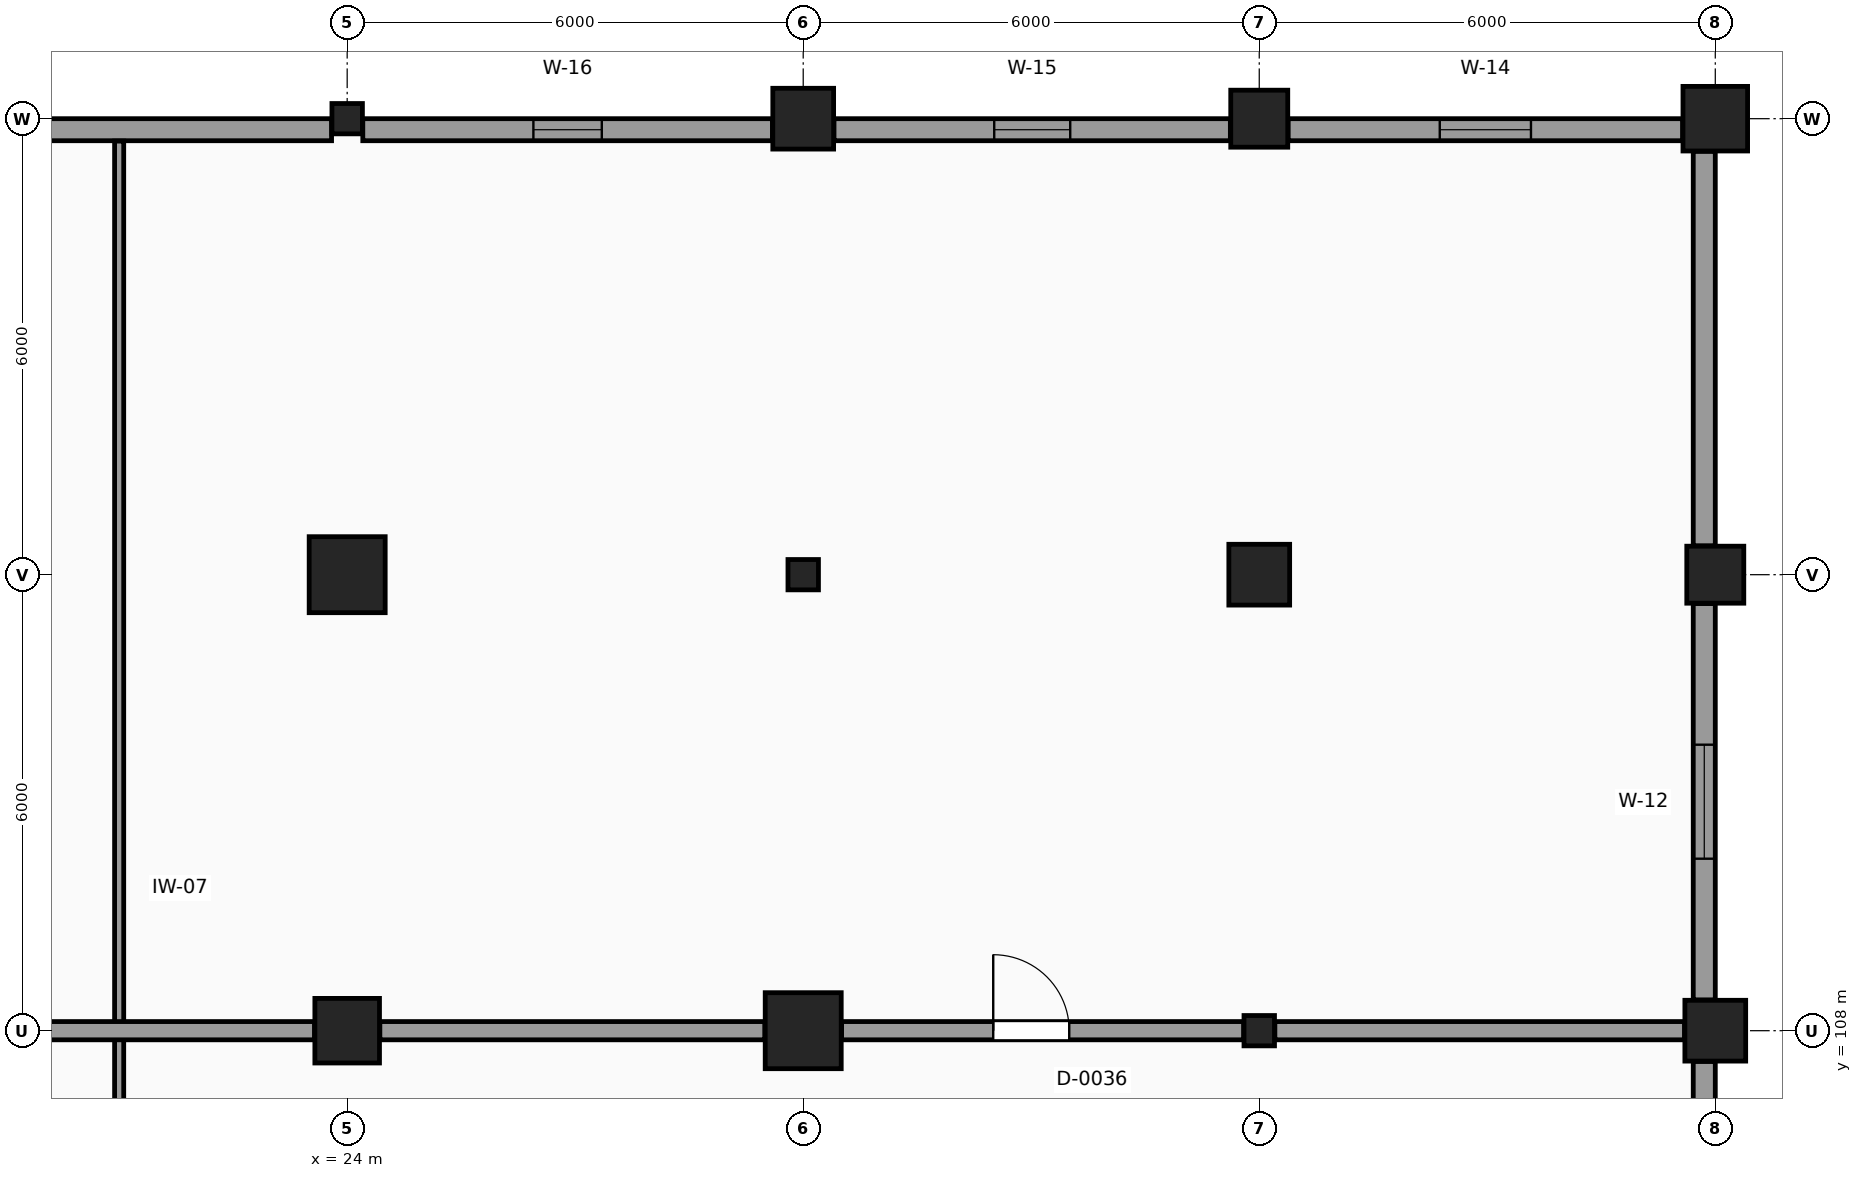
"""IFC4 building model, lengths in metres.
Left out: names, types, materials, properties, quantities, classifications, styles, units other than length and angle.
Written with IfcOpenShell. Run it as: python <this file> out.ifc"""

import sys

from ifc_helpers import new_model, si_unit, direction, frame, frame_2d, origin, origin_2d, place, context, subcontext, project, spatial, rectangle, circle, i_section, extrude, element, fill, save


model = new_model("IFC4")
c1 = context("Model", 3, precision=1e-05, world=origin(), true_north=direction((0.0, 1.0)))
c2 = subcontext(c1, "Body", "Model", "MODEL_VIEW")
j1 = project(units=[si_unit("LENGTHUNIT", "METRE"), si_unit("PLANEANGLEUNIT", "RADIAN")], contexts=[c1])
p1 = place(None, origin())
s1 = spatial("IfcSite", under=j1, at=p1, CompositionType="ELEMENT")
p2 = place(p1, origin())
s2 = spatial("IfcBuilding", under=s1, at=p2, CompositionType="ELEMENT")
p3 = place(p2, origin())
s3 = spatial("IfcBuildingStorey", under=s2, at=p3, CompositionType="ELEMENT", Elevation=0.0)
p4 = place(p3, frame((24.0, 108.0, 0.0), z_axis=(0.0, 0.0, 1.0), x_axis=(1.0, 0.0, 0.0)))
e1 = element("IfcColumn", 1, at=p4, inside=s3, PredefinedType="COLUMN", context=c2, shape_type="SweptSolid", body=[
    extrude(circle(Radius=0.425, at=origin_2d()), origin(), (0.0, 0.0, 1.0), 6.0),
])
p5 = place(p3, frame((24.0, 114.0, 0.0), z_axis=(0.0, 0.0, 1.0), x_axis=(1.0, 0.0, 0.0)))
e2 = element("IfcColumn", 2, at=p5, inside=s3, PredefinedType="COLUMN", context=c2, shape_type="SweptSolid", body=[
    extrude(circle(Radius=0.5, at=origin_2d()), origin(), (0.0, 0.0, 1.0), 6.0),
])
p6 = place(p3, frame((24.0, 120.0, 0.0), z_axis=(0.0, 0.0, 1.0), x_axis=(1.0, 0.0, 0.0)))
e3 = element("IfcColumn", 3, at=p6, inside=s3, PredefinedType="COLUMN", context=c2, shape_type="SweptSolid", body=[
    extrude(i_section(OverallWidth=0.401, OverallDepth=0.399, WebThickness=0.019, FlangeThickness=0.03, FilletRadius=0.015, at=origin_2d()), origin(), (0.0, 0.0, 1.0), 6.0),
])
p7 = place(p3, frame((30.0, 108.0, 0.0), z_axis=(0.0, 0.0, 1.0), x_axis=(1.0, 0.0, 0.0)))
e4 = element("IfcColumn", 4, at=p7, inside=s3, PredefinedType="COLUMN", context=c2, shape_type="SweptSolid", body=[
    extrude(circle(Radius=0.5, at=origin_2d()), origin(), (0.0, 0.0, 1.0), 6.0),
])
p8 = place(p3, frame((30.0, 114.0, 0.0), z_axis=(0.0, 0.0, 1.0), x_axis=(1.0, 0.0, 0.0)))
e5 = element("IfcColumn", 5, at=p8, inside=s3, PredefinedType="COLUMN", context=c2, shape_type="SweptSolid", body=[
    extrude(i_section(OverallWidth=0.401, OverallDepth=0.399, WebThickness=0.019, FlangeThickness=0.03, FilletRadius=0.015, at=origin_2d()), origin(), (0.0, 0.0, 1.0), 6.0),
])
p9 = place(p3, frame((30.0, 120.0, 0.0), z_axis=(0.0, 0.0, 1.0), x_axis=(1.0, 0.0, 0.0)))
e6 = element("IfcColumn", 6, at=p9, inside=s3, PredefinedType="COLUMN", context=c2, shape_type="SweptSolid", body=[
    extrude(rectangle(XDim=0.8, YDim=0.8, at=origin_2d()), origin(), (0.0, 0.0, 1.0), 6.0),
])
p10 = place(p3, frame((36.0, 108.0, 0.0), z_axis=(0.0, 0.0, 1.0), x_axis=(1.0, 0.0, 0.0)))
e7 = element("IfcColumn", 7, at=p10, inside=s3, PredefinedType="COLUMN", context=c2, shape_type="SweptSolid", body=[
    extrude(i_section(OverallWidth=0.401, OverallDepth=0.399, WebThickness=0.019, FlangeThickness=0.03, FilletRadius=0.015, at=origin_2d()), origin(), (0.0, 0.0, 1.0), 6.0),
])
p11 = place(p3, frame((36.0, 114.0, 0.0), z_axis=(0.0, 0.0, 1.0), x_axis=(1.0, 0.0, 0.0)))
e8 = element("IfcColumn", 8, at=p11, inside=s3, PredefinedType="COLUMN", context=c2, shape_type="SweptSolid", body=[
    extrude(rectangle(XDim=0.8, YDim=0.8, at=origin_2d()), origin(), (0.0, 0.0, 1.0), 6.0),
])
p12 = place(p3, frame((36.0, 120.0, 0.0), z_axis=(0.0, 0.0, 1.0), x_axis=(1.0, 0.0, 0.0)))
e9 = element("IfcColumn", 9, at=p12, inside=s3, PredefinedType="COLUMN", context=c2, shape_type="SweptSolid", body=[
    extrude(rectangle(XDim=0.75, YDim=0.75, at=origin_2d()), origin(), (0.0, 0.0, 1.0), 6.0),
])
p13 = place(p3, frame((42.0, 108.0, 0.0), z_axis=(0.0, 0.0, 1.0), x_axis=(1.0, 0.0, 0.0)))
e10 = element("IfcColumn", 10, at=p13, inside=s3, PredefinedType="COLUMN", context=c2, shape_type="SweptSolid", body=[
    extrude(rectangle(XDim=0.8, YDim=0.8, at=origin_2d()), origin(), (0.0, 0.0, 1.0), 6.0),
])
p14 = place(p3, frame((42.0, 114.0, 0.0), z_axis=(0.0, 0.0, 1.0), x_axis=(1.0, 0.0, 0.0)))
e11 = element("IfcColumn", 11, at=p14, inside=s3, PredefinedType="COLUMN", context=c2, shape_type="SweptSolid", body=[
    extrude(rectangle(XDim=0.75, YDim=0.75, at=origin_2d()), origin(), (0.0, 0.0, 1.0), 6.0),
])
p15 = place(p3, frame((42.0, 120.0, 0.0), z_axis=(0.0, 0.0, 1.0), x_axis=(1.0, 0.0, 0.0)))
e12 = element("IfcColumn", 12, at=p15, inside=s3, PredefinedType="COLUMN", context=c2, shape_type="SweptSolid", body=[
    extrude(circle(Radius=0.425, at=origin_2d()), origin(), (0.0, 0.0, 1.0), 6.0),
])
p16 = place(p3, frame((41.855, 102.205, 0.0), z_axis=(0.0, 0.0, 1.0), x_axis=(0.0, 1.0, 0.0)))
e13 = element("IfcWall", 13, at=p16, inside=s3, PredefinedType="SOLIDWALL", context=c2, shape_type="SweptSolid", body=[
    extrude(rectangle(XDim=5.39, YDim=0.29, at=frame_2d((2.695, 0.0))), origin(), (0.0, 0.0, 1.0), 4.99),
])
p17 = place(p16, frame((1.895, 0.0, 0.85)))
e14 = element("IfcOpeningElement", 14, at=p17, cuts=e13, PredefinedType="OPENING", context=c2, shape_type="SweptSolid", body=[
    extrude(rectangle(XDim=1.6, YDim=1.5, at=frame_2d((0.8, 0.75))), frame((0.0, 0.155, 0.0), z_axis=(0.0, -1.0, 0.0), x_axis=(1.0, 0.0, 0.0)), (0.0, 0.0, 1.0), 0.31),
])
p18 = place(p3, frame((41.855, 108.405, 0.0), z_axis=(0.0, 0.0, 1.0), x_axis=(0.0, 1.0, 0.0)))
e15 = element("IfcWall", 15, at=p18, inside=s3, PredefinedType="SOLIDWALL", context=c2, shape_type="SweptSolid", body=[
    extrude(rectangle(XDim=5.215, YDim=0.29, at=frame_2d((2.607, 0.0))), origin(), (0.0, 0.0, 1.0), 4.99),
])
p19 = place(p18, frame((1.858, 0.0, 0.85)))
e16 = element("IfcOpeningElement", 16, at=p19, cuts=e15, PredefinedType="OPENING", context=c2, shape_type="SweptSolid", body=[
    extrude(rectangle(XDim=1.5, YDim=1.5, at=frame_2d((0.75, 0.75))), frame((0.0, 0.155, 0.0), z_axis=(0.0, -1.0, 0.0), x_axis=(1.0, 0.0, 0.0)), (0.0, 0.0, 1.0), 0.31),
])
p20 = place(p3, frame((41.855, 114.38, 0.0), z_axis=(0.0, 0.0, 1.0), x_axis=(0.0, 1.0, 0.0)))
e17 = element("IfcWall", 17, at=p20, inside=s3, PredefinedType="SOLIDWALL", context=c2, shape_type="SweptSolid", body=[
    extrude(rectangle(XDim=5.19, YDim=0.29, at=frame_2d((2.595, 0.0))), origin(), (0.0, 0.0, 1.0), 4.99),
])
p21 = place(p3, frame((41.57, 119.855, 0.0), z_axis=(0.0, 0.0, 1.0), x_axis=(-1.0, 0.0, 0.0)))
e18 = element("IfcWall", 18, at=p21, inside=s3, PredefinedType="SOLIDWALL", context=c2, shape_type="SweptSolid", body=[
    extrude(rectangle(XDim=5.19, YDim=0.29, at=frame_2d((2.595, 0.0))), origin(), (0.0, 0.0, 1.0), 4.99),
])
p22 = place(p21, frame((1.995, 0.0, 0.85)))
e19 = element("IfcOpeningElement", 19, at=p22, cuts=e18, PredefinedType="OPENING", context=c2, shape_type="SweptSolid", body=[
    extrude(rectangle(XDim=1.2, YDim=1.4, at=frame_2d((0.6, 0.7))), frame((0.0, 0.155, 0.0), z_axis=(0.0, -1.0, 0.0), x_axis=(1.0, 0.0, 0.0)), (0.0, 0.0, 1.0), 0.31),
])
p23 = place(p3, frame((35.62, 119.855, 0.0), z_axis=(0.0, 0.0, 1.0), x_axis=(-1.0, 0.0, 0.0)))
e20 = element("IfcWall", 20, at=p23, inside=s3, PredefinedType="SOLIDWALL", context=c2, shape_type="SweptSolid", body=[
    extrude(rectangle(XDim=5.215, YDim=0.29, at=frame_2d((2.607, 0.0))), origin(), (0.0, 0.0, 1.0), 4.99),
])
p24 = place(p23, frame((2.107, 0.0, 0.85)))
e21 = element("IfcOpeningElement", 21, at=p24, cuts=e20, PredefinedType="OPENING", context=c2, shape_type="SweptSolid", body=[
    extrude(rectangle(XDim=1.0, YDim=1.35, at=frame_2d((0.5, 0.675))), frame((0.0, 0.155, 0.0), z_axis=(0.0, -1.0, 0.0), x_axis=(1.0, 0.0, 0.0)), (0.0, 0.0, 1.0), 0.31),
])
p25 = place(p3, frame((29.595, 119.855, 0.0), z_axis=(0.0, 0.0, 1.0), x_axis=(-1.0, 0.0, 0.0)))
e22 = element("IfcWall", 22, at=p25, inside=s3, PredefinedType="SOLIDWALL", context=c2, shape_type="SweptSolid", body=[
    extrude(rectangle(XDim=5.389, YDim=0.29, at=frame_2d((2.695, 0.0))), origin(), (0.0, 0.0, 1.0), 4.99),
])
p26 = place(p25, frame((2.245, 0.0, 0.85)))
e23 = element("IfcOpeningElement", 23, at=p26, cuts=e22, PredefinedType="OPENING", context=c2, shape_type="SweptSolid", body=[
    extrude(rectangle(XDim=0.9, YDim=1.3, at=frame_2d((0.45, 0.65))), frame((0.0, 0.155, 0.0), z_axis=(0.0, -1.0, 0.0), x_axis=(1.0, 0.0, 0.0)), (0.0, 0.0, 1.0), 0.31),
])
p27 = place(p3, frame((23.794, 119.855, 0.0), z_axis=(0.0, 0.0, 1.0), x_axis=(-1.0, 0.0, 0.0)))
e24 = element("IfcWall", 24, at=p27, inside=s3, PredefinedType="SOLIDWALL", context=c2, shape_type="SweptSolid", body=[
    extrude(rectangle(XDim=5.29, YDim=0.29, at=frame_2d((2.645, 0.0))), origin(), (0.0, 0.0, 1.0), 4.99),
])
p28 = place(p3, frame((21.0, 84.0, 0.0), z_axis=(0.0, 0.0, 1.0), x_axis=(0.0, 1.0, 0.0)))
e25 = element("IfcWall", 25, at=p28, inside=s3, PredefinedType="PARTITIONING", context=c2, shape_type="SweptSolid", body=[
    extrude(rectangle(XDim=35.705, YDim=0.12, at=frame_2d((17.853, 0.0))), origin(), (0.0, 0.0, 1.0), 5.24),
])
p29 = place(p28, frame((14.2, 0.0, 0.0)))
e26 = element("IfcOpeningElement", 26, at=p29, cuts=e25, PredefinedType="OPENING", context=c2, shape_type="SweptSolid", body=[
    extrude(rectangle(XDim=1.6, YDim=2.25, at=frame_2d((0.8, 1.125))), frame((0.0, 0.07, 0.0), z_axis=(0.0, -1.0, 0.0), x_axis=(1.0, 0.0, 0.0)), (0.0, 0.0, 1.0), 0.14),
])
p30 = place(p3, frame((18.38, 108.0, 0.0), z_axis=(0.0, 0.0, 1.0), x_axis=(1.0, 0.0, 0.0)))
e27 = element("IfcWall", 27, at=p30, inside=s3, PredefinedType="PARTITIONING", context=c2, shape_type="SweptSolid", body=[
    extrude(rectangle(XDim=5.19, YDim=0.24, at=frame_2d((2.595, 0.0))), origin(), (0.0, 0.0, 1.0), 5.45),
])
p31 = place(p3, frame((24.43, 108.0, 0.0), z_axis=(0.0, 0.0, 1.0), x_axis=(1.0, 0.0, 0.0)))
e28 = element("IfcWall", 28, at=p31, inside=s3, PredefinedType="PARTITIONING", context=c2, shape_type="SweptSolid", body=[
    extrude(rectangle(XDim=5.065, YDim=0.24, at=frame_2d((2.533, 0.0))), origin(), (0.0, 0.0, 1.0), 4.94),
])
p32 = place(p3, frame((30.505, 108.0, 0.0), z_axis=(0.0, 0.0, 1.0), x_axis=(1.0, 0.0, 0.0)))
e29 = element("IfcWall", 29, at=p32, inside=s3, PredefinedType="PARTITIONING", context=c2, shape_type="SweptSolid", body=[
    extrude(rectangle(XDim=5.29, YDim=0.24, at=frame_2d((2.645, 0.0))), origin(), (0.0, 0.0, 1.0), 5.04),
])
p33 = place(p32, frame((1.995, 0.0, 0.0)))
e30 = element("IfcOpeningElement", 30, at=p33, cuts=e29, PredefinedType="OPENING", context=c2, shape_type="SweptSolid", body=[
    extrude(rectangle(XDim=1.0, YDim=2.15, at=frame_2d((0.5, 1.075))), frame((0.0, 0.13, 0.0), z_axis=(0.0, -1.0, 0.0), x_axis=(1.0, 0.0, 0.0)), (0.0, 0.0, 1.0), 0.26),
])
p34 = place(p3, frame((36.206, 108.0, 0.0), z_axis=(0.0, 0.0, 1.0), x_axis=(1.0, 0.0, 0.0)))
e31 = element("IfcWall", 31, at=p34, inside=s3, PredefinedType="PARTITIONING", context=c2, shape_type="SweptSolid", body=[
    extrude(rectangle(XDim=5.389, YDim=0.24, at=frame_2d((2.695, 0.0))), origin(), (0.0, 0.0, 1.0), 5.14),
])
p35 = place(p19, origin())
e32 = element("IfcWindow", 32, at=p35, inside=s3, PartitioningType="SINGLE_PANEL", PredefinedType="WINDOW", context=c2, shape_type="SweptSolid", body=[
    extrude(rectangle(XDim=1.5, YDim=1.5, at=frame_2d((0.75, 0.75))), frame((0.0, 0.03, 0.0), z_axis=(0.0, -1.0, 0.0), x_axis=(1.0, 0.0, 0.0)), (0.0, 0.0, 1.0), 0.06),
])
fill(e16, e32)
p36 = place(p22, origin())
e33 = element("IfcWindow", 33, at=p36, inside=s3, PartitioningType="SINGLE_PANEL", PredefinedType="WINDOW", context=c2, shape_type="SweptSolid", body=[
    extrude(rectangle(XDim=1.2, YDim=1.4, at=frame_2d((0.6, 0.7))), frame((0.0, 0.03, 0.0), z_axis=(0.0, -1.0, 0.0), x_axis=(1.0, 0.0, 0.0)), (0.0, 0.0, 1.0), 0.06),
])
fill(e19, e33)
p37 = place(p24, origin())
e34 = element("IfcWindow", 34, at=p37, inside=s3, PartitioningType="SINGLE_PANEL", PredefinedType="WINDOW", context=c2, shape_type="SweptSolid", body=[
    extrude(rectangle(XDim=1.0, YDim=1.35, at=frame_2d((0.5, 0.675))), frame((0.0, 0.03, 0.0), z_axis=(0.0, -1.0, 0.0), x_axis=(1.0, 0.0, 0.0)), (0.0, 0.0, 1.0), 0.06),
])
fill(e21, e34)
p38 = place(p26, origin())
e35 = element("IfcWindow", 35, at=p38, inside=s3, PartitioningType="SINGLE_PANEL", PredefinedType="WINDOW", context=c2, shape_type="SweptSolid", body=[
    extrude(rectangle(XDim=0.9, YDim=1.3, at=frame_2d((0.45, 0.65))), frame((0.0, 0.03, 0.0), z_axis=(0.0, -1.0, 0.0), x_axis=(1.0, 0.0, 0.0)), (0.0, 0.0, 1.0), 0.06),
])
fill(e23, e35)
p39 = place(p33, origin())
e36 = element("IfcDoor", 36, at=p39, inside=s3, OperationType="SINGLE_SWING_LEFT", PredefinedType="DOOR", context=c2, shape_type="SweptSolid", body=[
    extrude(rectangle(XDim=1.0, YDim=2.15, at=frame_2d((0.5, 1.075))), frame((0.0, 0.025, 0.0), z_axis=(0.0, -1.0, 0.0), x_axis=(1.0, 0.0, 0.0)), (0.0, 0.0, 1.0), 0.05),
])
fill(e30, e36)
save(model, sys.argv[1])
